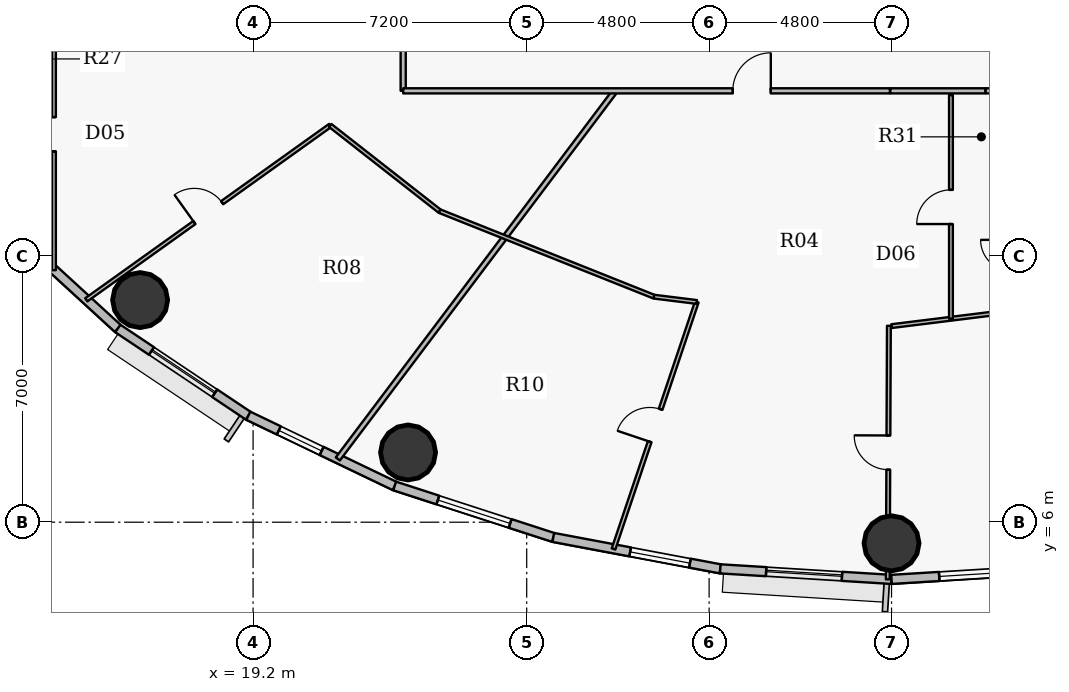
"""IFC4 building model, lengths in metres.
Left out: names, types, materials, properties, quantities, classifications, styles, units other than length and angle.
Written with IfcOpenShell. Run it as: python <this file> out.ifc"""

import sys

from ifc_helpers import new_model, si_unit, direction, frame, frame_2d, origin, origin_2d, place, context, subcontext, project, spatial, rectangle, hollow_circle, extrude, source, transform, mapped, element, fill, save


model = new_model("IFC4")
c1 = context("Model", 3, precision=1e-05, world=origin(), true_north=direction((0.0, 1.0)))
c2 = subcontext(c1, "Body", "Model", "MODEL_VIEW")
j1 = project(units=[si_unit("LENGTHUNIT", "METRE"), si_unit("PLANEANGLEUNIT", "RADIAN")], contexts=[c1])
p1 = place(None, origin())
s1 = spatial("IfcSite", under=j1, at=p1, CompositionType="ELEMENT")
p2 = place(p1, origin())
s2 = spatial("IfcBuilding", under=s1, at=p2, CompositionType="ELEMENT")
p3 = place(p2, frame((0.0, 0.0, 108.45)))
s3 = spatial("IfcBuildingStorey", under=s2, at=p3, CompositionType="ELEMENT", Elevation=108.45)
for number, where, z_axis, x_axis in (
    (1, (16.227, 11.844, 0.0), (0.0, 0.0, 1.0), (1.0, 0.0, 0.0)),
    (2, (23.278, 7.835, 0.0), (0.0, 0.0, 1.0), (1.0, 0.0, 0.0)),
    (3, (36.0, 5.445, 0.0), (0.0, 0.0, 1.0), (1.0, 0.0, 0.0)),
):
    element("IfcColumn", number, at=place(p3, frame(where, z_axis=z_axis, x_axis=x_axis)), inside=s3, PredefinedType="COLUMN", context=c2, shape_type="SweptSolid", body=[
        extrude(hollow_circle(Radius=0.725, WallThickness=0.042, at=origin_2d()), origin(), (0.0, 0.0, 1.0), 3.75),
    ])
p4 = place(p3, frame((15.642, 11.097, 0.0), z_axis=(0.0, 0.0, 1.0), x_axis=(-0.737113356241, 0.675769117414, 0.0)))
e4 = element("IfcWall", 4, at=p4, inside=s3, PredefinedType="SOLIDWALL", context=c2, shape_type="SweptSolid", body=[
    extrude(rectangle(XDim=3.976, YDim=0.24, at=frame_2d((1.988, 0.0))), origin(), (0.0, 0.0, 1.0), 3.5),
])
p5 = place(p4, frame((2.546, 0.0, 0.9)))
e5 = element("IfcOpeningElement", 5, at=p5, cuts=e4, PredefinedType="OPENING", context=c2, shape_type="SweptSolid", body=[
    extrude(rectangle(XDim=1.25, YDim=1.65, at=origin_2d()), frame((0.625, 0.13, 0.825), z_axis=(0.0, -1.0, 0.0), x_axis=(1.0, 0.0, 0.0)), (0.0, 0.0, 1.0), 0.26),
])
p6 = place(p3, frame((19.075, 8.801, 0.0), z_axis=(0.0, 0.0, 1.0), x_axis=(-0.831221811447, 0.555940914284, 0.0)))
e6 = element("IfcWall", 6, at=p6, inside=s3, PredefinedType="SOLIDWALL", context=c2, shape_type="SweptSolid", body=[
    extrude(rectangle(XDim=4.13, YDim=0.24, at=frame_2d((2.065, 0.0))), origin(), (0.0, 0.0, 1.0), 3.5),
])
p7 = place(p6, frame((1.065, 0.0, 0.9)))
e7 = element("IfcOpeningElement", 7, at=p7, cuts=e6, PredefinedType="OPENING", context=c2, shape_type="SweptSolid", body=[
    extrude(rectangle(XDim=2.0, YDim=1.75, at=origin_2d()), frame((1.0, 0.13, 0.875), z_axis=(0.0, -1.0, 0.0), x_axis=(1.0, 0.0, 0.0)), (0.0, 0.0, 1.0), 0.26),
])
p8 = place(p3, frame((22.926, 6.953, 0.0), z_axis=(0.0, 0.0, 1.0), x_axis=(-0.901589935876, 0.432591709962, 0.0)))
e8 = element("IfcWall", 8, at=p8, inside=s3, PredefinedType="SOLIDWALL", context=c2, shape_type="SweptSolid", body=[
    extrude(rectangle(XDim=4.272, YDim=0.24, at=frame_2d((2.136, 0.0))), origin(), (0.0, 0.0, 1.0), 3.5),
])
p9 = place(p8, frame((2.132, 0.0, 0.9)))
e9 = element("IfcOpeningElement", 9, at=p9, cuts=e8, PredefinedType="OPENING", context=c2, shape_type="SweptSolid", body=[
    extrude(rectangle(XDim=1.25, YDim=1.65, at=origin_2d()), frame((0.625, 0.13, 0.825), z_axis=(0.0, -1.0, 0.0), x_axis=(1.0, 0.0, 0.0)), (0.0, 0.0, 1.0), 0.26),
])
p10 = place(p3, frame((27.1, 5.599, 0.0), z_axis=(0.0, 0.0, 1.0), x_axis=(-0.951211346073, 0.308540070495, 0.0)))
e10 = element("IfcWall", 10, at=p10, inside=s3, PredefinedType="SOLIDWALL", context=c2, shape_type="SweptSolid", body=[
    extrude(rectangle(XDim=4.388, YDim=0.24, at=frame_2d((2.194, 0.0))), origin(), (0.0, 0.0, 1.0), 3.5),
])
p11 = place(p10, frame((1.194, 0.0, 0.9)))
e11 = element("IfcOpeningElement", 11, at=p11, cuts=e10, PredefinedType="OPENING", context=c2, shape_type="SweptSolid", body=[
    extrude(rectangle(XDim=2.0, YDim=1.75, at=origin_2d()), frame((1.0, 0.13, 0.875), z_axis=(0.0, -1.0, 0.0), x_axis=(1.0, 0.0, 0.0)), (0.0, 0.0, 1.0), 0.26),
])
p12 = place(p3, frame((31.494, 4.773, 0.0), z_axis=(0.0, 0.0, 1.0), x_axis=(-0.982789252177, 0.184730305596, 0.0)))
e12 = element("IfcWall", 12, at=p12, inside=s3, PredefinedType="SOLIDWALL", context=c2, shape_type="SweptSolid", body=[
    extrude(rectangle(XDim=4.471, YDim=0.24, at=frame_2d((2.235, 0.0))), origin(), (0.0, 0.0, 1.0), 3.5),
])
p13 = place(p12, frame((0.814, 0.0, 0.9)))
e13 = element("IfcOpeningElement", 13, at=p13, cuts=e12, PredefinedType="OPENING", context=c2, shape_type="SweptSolid", body=[
    extrude(rectangle(XDim=1.6, YDim=1.75, at=origin_2d()), frame((0.8, 0.13, 0.875), z_axis=(0.0, -1.0, 0.0), x_axis=(1.0, 0.0, 0.0)), (0.0, 0.0, 1.0), 0.26),
])
p14 = place(p3, frame((36.0, 4.495, 0.0), z_axis=(0.0, 0.0, 1.0), x_axis=(-0.998107531589, 0.061492726276, 0.0)))
e14 = element("IfcWall", 14, at=p14, inside=s3, PredefinedType="SOLIDWALL", context=c2, shape_type="SweptSolid", body=[
    extrude(rectangle(XDim=4.514, YDim=0.24, at=frame_2d((2.257, 0.0))), origin(), (0.0, 0.0, 1.0), 3.5),
])
p15 = place(p14, frame((1.306, 0.0, 0.9)))
e15 = element("IfcOpeningElement", 15, at=p15, cuts=e14, PredefinedType="OPENING", context=c2, shape_type="SweptSolid", body=[
    extrude(rectangle(XDim=2.0, YDim=1.75, at=origin_2d()), frame((1.0, 0.13, 0.875), z_axis=(0.0, -1.0, 0.0), x_axis=(1.0, 0.0, 0.0)), (0.0, 0.0, 1.0), 0.26),
])
p16 = place(p3, frame((40.506, 4.773, 0.0), z_axis=(0.0, 0.0, 1.0), x_axis=(-0.998107531589, -0.061492726276, 0.0)))
e16 = element("IfcWall", 16, at=p16, inside=s3, PredefinedType="SOLIDWALL", context=c2, shape_type="SweptSolid", body=[
    extrude(rectangle(XDim=4.514, YDim=0.24, at=frame_2d((2.257, 0.0))), origin(), (0.0, 0.0, 1.0), 3.5),
])
p17 = place(p16, frame((1.257, 0.0, 0.9)))
e17 = element("IfcOpeningElement", 17, at=p17, cuts=e16, PredefinedType="OPENING", context=c2, shape_type="SweptSolid", body=[
    extrude(rectangle(XDim=2.0, YDim=1.75, at=origin_2d()), frame((1.0, 0.13, 0.875), z_axis=(0.0, -1.0, 0.0), x_axis=(1.0, 0.0, 0.0)), (0.0, 0.0, 1.0), 0.26),
])
p18 = place(p3, frame((9.533, 18.337, 0.0), z_axis=(0.0, 0.0, 1.0), x_axis=(0.950384937961, 0.311076308478, 0.0)))
e18 = element("IfcWall", 18, at=p18, inside=s3, PredefinedType="PARTITIONING", context=c2, shape_type="SweptSolid", body=[
    extrude(rectangle(XDim=8.396, YDim=0.1, at=frame_2d((4.198, 0.0))), origin(), (0.0, 0.0, 1.0), 2.935),
])
p19 = place(p18, frame((6.057, 0.0, 0.0)))
e19 = element("IfcOpeningElement", 19, at=p19, cuts=e18, PredefinedType="OPENING", context=c2, shape_type="SweptSolid", body=[
    extrude(rectangle(XDim=0.9, YDim=2.1, at=origin_2d()), frame((0.45, 0.06, 1.05), z_axis=(0.0, -1.0, 0.0), x_axis=(1.0, 0.0, 0.0)), (0.0, 0.0, 1.0), 0.12),
])
p20 = place(p18, frame((0.88, 0.0, 0.0)))
e20 = element("IfcOpeningElement", 20, at=p20, cuts=e18, PredefinedType="OPENING", context=c2, shape_type="SweptSolid", body=[
    extrude(rectangle(XDim=0.82, YDim=2.1, at=origin_2d()), frame((0.41, 0.06, 1.05), z_axis=(0.0, -1.0, 0.0), x_axis=(1.0, 0.0, 0.0)), (0.0, 0.0, 1.0), 0.12),
])
p21 = place(p3, frame((13.96, 12.631, 0.0), z_axis=(0.0, 0.0, 1.0), x_axis=(0.0, 1.0, 0.0)))
e21 = element("IfcWall", 21, at=p21, inside=s3, PredefinedType="PARTITIONING", context=c2, shape_type="SweptSolid", body=[
    extrude(rectangle(XDim=7.154, YDim=0.1, at=frame_2d((3.577, 0.0))), origin(), (0.0, 0.0, 1.0), 2.935),
])
p22 = place(p21, frame((3.127, 0.0, 0.0)))
e22 = element("IfcOpeningElement", 22, at=p22, cuts=e21, PredefinedType="OPENING", context=c2, shape_type="SweptSolid", body=[
    extrude(rectangle(XDim=0.9, YDim=2.1, at=origin_2d()), frame((0.45, 0.06, 1.05), z_axis=(0.0, -1.0, 0.0), x_axis=(1.0, 0.0, 0.0)), (0.0, 0.0, 1.0), 0.12),
])
p23 = place(p3, frame((14.811, 11.851, 0.0), z_axis=(0.0, 0.0, 1.0), x_axis=(0.813476205606, 0.581598197137, 0.0)))
e23 = element("IfcWall", 23, at=p23, inside=s3, PredefinedType="PARTITIONING", context=c2, shape_type="SweptSolid", body=[
    extrude(rectangle(XDim=7.889, YDim=0.1, at=frame_2d((3.945, 0.0))), origin(), (0.0, 0.0, 1.0), 2.935),
])
p24 = place(p23, frame((3.495, 0.0, 0.0)))
e24 = element("IfcOpeningElement", 24, at=p24, cuts=e23, PredefinedType="OPENING", context=c2, shape_type="SweptSolid", body=[
    extrude(rectangle(XDim=0.9, YDim=2.1, at=origin_2d()), frame((0.45, 0.06, 1.05), z_axis=(0.0, -1.0, 0.0), x_axis=(1.0, 0.0, 0.0)), (0.0, 0.0, 1.0), 0.12),
])
p25 = place(p3, frame((21.229, 16.44, 0.0), z_axis=(0.0, 0.0, 1.0), x_axis=(0.787324700524, -0.616538576201, 0.0)))
e25 = element("IfcWall", 25, at=p25, inside=s3, PredefinedType="PARTITIONING", context=c2, shape_type="SweptSolid", body=[
    extrude(rectangle(XDim=3.658, YDim=0.1, at=frame_2d((1.829, 0.0))), origin(), (0.0, 0.0, 1.0), 2.935),
])
p26 = place(p3, frame((21.43, 7.665, 0.0), z_axis=(0.0, 0.0, 1.0), x_axis=(0.601821582461, 0.798630567211, 0.0)))
e26 = element("IfcWall", 26, at=p26, inside=s3, PredefinedType="PARTITIONING", context=c2, shape_type="SweptSolid", body=[
    extrude(rectangle(XDim=12.127, YDim=0.135, at=frame_2d((6.063, 0.0))), origin(), (0.0, 0.0, 1.0), 2.935),
])
p27 = place(p3, frame((23.15, 17.35, 0.0), z_axis=(0.0, 0.0, 1.0), x_axis=(0.0, 1.0, 0.0)))
e27 = element("IfcWall", 27, at=p27, inside=s3, PredefinedType="PARTITIONING", context=c2, shape_type="SweptSolid", body=[
    extrude(rectangle(XDim=19.3, YDim=0.135, at=frame_2d((9.65, 0.0))), origin(), (0.0, 0.0, 1.0), 2.935),
])
p28 = place(p27, frame((15.889, 0.0, 0.0)))
e28 = element("IfcOpeningElement", 28, at=p28, cuts=e27, PredefinedType="OPENING", context=c2, shape_type="SweptSolid", body=[
    extrude(rectangle(XDim=1.0, YDim=2.15, at=origin_2d()), frame((0.5, 0.078, 1.075), z_axis=(0.0, -1.0, 0.0), x_axis=(1.0, 0.0, 0.0)), (0.0, 0.0, 1.0), 0.155),
])
p29 = place(p27, frame((6.279, 0.0, 0.0)))
e29 = element("IfcOpeningElement", 29, at=p29, cuts=e27, PredefinedType="OPENING", context=c2, shape_type="SweptSolid", body=[
    extrude(rectangle(XDim=1.0, YDim=2.15, at=origin_2d()), frame((0.5, 0.078, 1.075), z_axis=(0.0, -1.0, 0.0), x_axis=(1.0, 0.0, 0.0)), (0.0, 0.0, 1.0), 0.155),
])
p30 = place(p3, frame((23.15, 17.35, 0.0), z_axis=(0.0, 0.0, 1.0), x_axis=(1.0, 0.0, 0.0)))
e30 = element("IfcWall", 30, at=p30, inside=s3, PredefinedType="PARTITIONING", context=c2, shape_type="SweptSolid", body=[
    extrude(rectangle(XDim=12.808, YDim=0.135, at=frame_2d((6.404, 0.0))), origin(), (0.0, 0.0, 1.0), 2.935),
])
p31 = place(p30, frame((8.673, 0.0, 0.0)))
e31 = element("IfcOpeningElement", 31, at=p31, cuts=e30, PredefinedType="OPENING", context=c2, shape_type="SweptSolid", body=[
    extrude(rectangle(XDim=1.0, YDim=2.15, at=origin_2d()), frame((0.5, 0.078, 1.075), z_axis=(0.0, -1.0, 0.0), x_axis=(1.0, 0.0, 0.0)), (0.0, 0.0, 1.0), 0.155),
])
p32 = place(p3, frame((24.109, 14.184, 0.0), z_axis=(0.0, 0.0, 1.0), x_axis=(0.928803554156, -0.370572473055, 0.0)))
e32 = element("IfcWall", 32, at=p32, inside=s3, PredefinedType="PARTITIONING", context=c2, shape_type="SweptSolid", body=[
    extrude(rectangle(XDim=6.072, YDim=0.1, at=frame_2d((3.036, 0.0))), origin(), (0.0, 0.0, 1.0), 2.935),
])
p33 = place(p3, frame((28.685, 5.296, 0.0), z_axis=(0.0, 0.0, 1.0), x_axis=(0.319387131438, 0.947624324441, 0.0)))
e33 = element("IfcWall", 33, at=p33, inside=s3, PredefinedType="PARTITIONING", context=c2, shape_type="SweptSolid", body=[
    extrude(rectangle(XDim=6.858, YDim=0.1, at=frame_2d((3.429, 0.0))), origin(), (0.0, 0.0, 1.0), 2.935),
])
p34 = place(p33, frame((2.979, 0.0, 0.0)))
e34 = element("IfcOpeningElement", 34, at=p34, cuts=e33, PredefinedType="OPENING", context=c2, shape_type="SweptSolid", body=[
    extrude(rectangle(XDim=0.9, YDim=2.1, at=origin_2d()), frame((0.45, 0.06, 1.05), z_axis=(0.0, -1.0, 0.0), x_axis=(1.0, 0.0, 0.0)), (0.0, 0.0, 1.0), 0.12),
])
p35 = place(p3, frame((29.749, 11.934, 0.0), z_axis=(0.0, 0.0, 1.0), x_axis=(0.99240961586, -0.122976234894, 0.0)))
e35 = element("IfcWall", 35, at=p35, inside=s3, PredefinedType="PARTITIONING", context=c2, shape_type="SweptSolid", body=[
    extrude(rectangle(XDim=1.135, YDim=0.1, at=frame_2d((0.568, 0.0))), origin(), (0.0, 0.0, 1.0), 3.5),
])
p36 = place(p3, frame((35.902, 4.496, 0.0), z_axis=(0.0, 0.0, 1.0), x_axis=(0.004354785612, 0.999990517876, 0.0)))
e36 = element("IfcWall", 36, at=p36, inside=s3, PredefinedType="PARTITIONING", context=c2, shape_type="SweptSolid", body=[
    extrude(rectangle(XDim=6.671, YDim=0.1, at=frame_2d((3.336, 0.0))), origin(), (0.0, 0.0, 1.0), 2.935),
])
p37 = place(p36, frame((2.886, 0.0, 0.0)))
e37 = element("IfcOpeningElement", 37, at=p37, cuts=e36, PredefinedType="OPENING", context=c2, shape_type="SweptSolid", body=[
    extrude(rectangle(XDim=0.9, YDim=2.1, at=origin_2d()), frame((0.45, 0.06, 1.05), z_axis=(0.0, -1.0, 0.0), x_axis=(1.0, 0.0, 0.0)), (0.0, 0.0, 1.0), 0.12),
])
p38 = place(p3, frame((36.0, 11.159, 0.0), z_axis=(0.0, 0.0, 1.0), x_axis=(0.992395485088, 0.123090215599, 0.0)))
e38 = element("IfcWall", 38, at=p38, inside=s3, PredefinedType="PARTITIONING", context=c2, shape_type="SweptSolid", body=[
    extrude(rectangle(XDim=6.299, YDim=0.1, at=frame_2d((3.15, 0.0))), origin(), (0.0, 0.0, 1.0), 2.935),
])
p39 = place(p3, frame((37.564, 11.353, 0.0), z_axis=(0.0, 0.0, 1.0), x_axis=(0.0, 1.0, 0.0)))
e39 = element("IfcWall", 39, at=p39, inside=s3, PredefinedType="PARTITIONING", context=c2, shape_type="SweptSolid", body=[
    extrude(rectangle(XDim=5.884, YDim=0.1, at=frame_2d((2.942, 0.0))), origin(), (0.0, 0.0, 1.0), 3.125),
])
p40 = place(p39, frame((2.492, 0.0, 0.0)))
e40 = element("IfcOpeningElement", 40, at=p40, cuts=e39, PredefinedType="OPENING", context=c2, shape_type="SweptSolid", body=[
    extrude(rectangle(XDim=0.9, YDim=2.1, at=origin_2d()), frame((0.45, 0.06, 1.05), z_axis=(0.0, -1.0, 0.0), x_axis=(1.0, 0.0, 0.0)), (0.0, 0.0, 1.0), 0.12),
])
p41 = place(p3, frame((38.477, 17.35, 0.0), z_axis=(0.0, 0.0, 1.0), x_axis=(1.0, 0.0, 0.0)))
e41 = element("IfcWall", 41, at=p41, inside=s3, PredefinedType="PARTITIONING", context=c2, shape_type="SweptSolid", body=[
    extrude(rectangle(XDim=10.373, YDim=0.135, at=frame_2d((5.187, 0.0))), origin(), (0.0, 0.0, 1.0), 2.935),
])
p42 = place(p3, frame((38.467, 17.35, 0.0), z_axis=(0.0, 0.0, 1.0), x_axis=(-1.0, 0.0, 0.0)))
e42 = element("IfcWall", 42, at=p42, inside=s3, PredefinedType="PARTITIONING", context=c2, shape_type="SweptSolid", body=[
    extrude(rectangle(XDim=2.499, YDim=0.135, at=frame_2d((1.25, 0.0))), origin(), (0.0, 0.0, 1.0), 2.935),
])
m1 = source(origin(), c2, "Body", "SweptSolid", [
    extrude(rectangle(XDim=2.0, YDim=1.75, at=origin_2d()), frame((1.0, 0.03, 0.875), z_axis=(0.0, -1.0, 0.0), x_axis=(1.0, 0.0, 0.0)), (0.0, 0.0, 1.0), 0.06),
])
p43 = place(p7, origin())
e43 = element("IfcWindow", 43, at=p43, inside=s3, PartitioningType="DOUBLE_PANEL_VERTICAL", PredefinedType="WINDOW", context=c2, shape_type="MappedRepresentation", body=[
    mapped(m1, transform((0.0, 0.0, 0.0), x_axis=(1.0, 0.0, 0.0), y_axis=(0.0, 1.0, 0.0), z_axis=(0.0, 0.0, 1.0), scale=1.0)),
])
fill(e7, e43)
m2 = source(origin(), c2, "Body", "SweptSolid", [
    extrude(rectangle(XDim=1.25, YDim=1.65, at=origin_2d()), frame((0.625, 0.03, 0.825), z_axis=(0.0, -1.0, 0.0), x_axis=(1.0, 0.0, 0.0)), (0.0, 0.0, 1.0), 0.06),
])
p44 = place(p9, origin())
e44 = element("IfcWindow", 44, at=p44, inside=s3, PartitioningType="SINGLE_PANEL", PredefinedType="WINDOW", context=c2, shape_type="MappedRepresentation", body=[
    mapped(m2, transform((0.0, 0.0, 0.0), x_axis=(1.0, 0.0, 0.0), y_axis=(0.0, 1.0, 0.0), z_axis=(0.0, 0.0, 1.0), scale=1.0)),
])
fill(e9, e44)
p45 = place(p11, origin())
e45 = element("IfcWindow", 45, at=p45, inside=s3, PartitioningType="DOUBLE_PANEL_VERTICAL", PredefinedType="WINDOW", context=c2, shape_type="MappedRepresentation", body=[
    mapped(m1, transform((0.0, 0.0, 0.0), x_axis=(1.0, 0.0, 0.0), y_axis=(0.0, 1.0, 0.0), z_axis=(0.0, 0.0, 1.0), scale=1.0)),
])
fill(e11, e45)
m3 = source(origin(), c2, "Body", "SweptSolid", [
    extrude(rectangle(XDim=1.6, YDim=1.75, at=origin_2d()), frame((0.8, 0.03, 0.875), z_axis=(0.0, -1.0, 0.0), x_axis=(1.0, 0.0, 0.0)), (0.0, 0.0, 1.0), 0.06),
])
p46 = place(p13, origin())
e46 = element("IfcWindow", 46, at=p46, inside=s3, PartitioningType="DOUBLE_PANEL_VERTICAL", PredefinedType="WINDOW", context=c2, shape_type="MappedRepresentation", body=[
    mapped(m3, transform((0.0, 0.0, 0.0), x_axis=(1.0, 0.0, 0.0), y_axis=(0.0, 1.0, 0.0), z_axis=(0.0, 0.0, 1.0), scale=1.0)),
])
fill(e13, e46)
p47 = place(p15, origin())
e47 = element("IfcWindow", 47, at=p47, inside=s3, PartitioningType="DOUBLE_PANEL_VERTICAL", PredefinedType="WINDOW", context=c2, shape_type="MappedRepresentation", body=[
    mapped(m1, transform((0.0, 0.0, 0.0), x_axis=(1.0, 0.0, 0.0), y_axis=(0.0, 1.0, 0.0), z_axis=(0.0, 0.0, 1.0), scale=1.0)),
])
fill(e15, e47)
p48 = place(p17, origin())
e48 = element("IfcWindow", 48, at=p48, inside=s3, PartitioningType="DOUBLE_PANEL_VERTICAL", PredefinedType="WINDOW", context=c2, shape_type="MappedRepresentation", body=[
    mapped(m1, transform((0.0, 0.0, 0.0), x_axis=(1.0, 0.0, 0.0), y_axis=(0.0, 1.0, 0.0), z_axis=(0.0, 0.0, 1.0), scale=1.0)),
])
fill(e17, e48)
m4 = source(origin(), c2, "Body", "SweptSolid", [
    extrude(rectangle(XDim=0.9, YDim=2.1, at=origin_2d()), frame((0.45, 0.025, 1.05), z_axis=(0.0, -1.0, 0.0), x_axis=(1.0, 0.0, 0.0)), (0.0, 0.0, 1.0), 0.05),
])
p49 = place(p24, origin())
e49 = element("IfcDoor", 49, at=p49, inside=s3, OperationType="SINGLE_SWING_LEFT", PredefinedType="DOOR", context=c2, shape_type="MappedRepresentation", body=[
    mapped(m4, transform((0.0, 0.0, 0.0), x_axis=(1.0, 0.0, 0.0), y_axis=(0.0, 1.0, 0.0), z_axis=(0.0, 0.0, 1.0), scale=1.0)),
])
fill(e24, e49)
p50 = place(p22, origin())
e50 = element("IfcDoor", 50, at=p50, inside=s3, OperationType="SINGLE_SWING_LEFT", PredefinedType="DOOR", context=c2, shape_type="MappedRepresentation", body=[
    mapped(m4, transform((0.0, 0.0, 0.0), x_axis=(1.0, 0.0, 0.0), y_axis=(0.0, 1.0, 0.0), z_axis=(0.0, 0.0, 1.0), scale=1.0)),
])
fill(e22, e50)
m5 = source(origin(), c2, "Body", "SweptSolid", [
    extrude(rectangle(XDim=1.0, YDim=2.15, at=origin_2d()), frame((0.5, 0.025, 1.075), z_axis=(0.0, -1.0, 0.0), x_axis=(1.0, 0.0, 0.0)), (0.0, 0.0, 1.0), 0.05),
])
p51 = place(p31, origin())
e51 = element("IfcDoor", 51, at=p51, inside=s3, OperationType="SINGLE_SWING_RIGHT", PredefinedType="DOOR", context=c2, shape_type="MappedRepresentation", body=[
    mapped(m5, transform((0.0, 0.0, 0.0), x_axis=(1.0, 0.0, 0.0), y_axis=(0.0, 1.0, 0.0), z_axis=(0.0, 0.0, 1.0), scale=1.0)),
])
fill(e31, e51)
p52 = place(p34, origin())
e52 = element("IfcDoor", 52, at=p52, inside=s3, OperationType="SINGLE_SWING_LEFT", PredefinedType="DOOR", context=c2, shape_type="MappedRepresentation", body=[
    mapped(m4, transform((0.0, 0.0, 0.0), x_axis=(1.0, 0.0, 0.0), y_axis=(0.0, 1.0, 0.0), z_axis=(0.0, 0.0, 1.0), scale=1.0)),
])
fill(e34, e52)
p53 = place(p37, origin())
e53 = element("IfcDoor", 53, at=p53, inside=s3, OperationType="SINGLE_SWING_RIGHT", PredefinedType="DOOR", context=c2, shape_type="MappedRepresentation", body=[
    mapped(m4, transform((0.0, 0.0, 0.0), x_axis=(1.0, 0.0, 0.0), y_axis=(0.0, 1.0, 0.0), z_axis=(0.0, 0.0, 1.0), scale=1.0)),
])
fill(e37, e53)
p54 = place(p40, origin())
e54 = element("IfcDoor", 54, at=p54, inside=s3, OperationType="SINGLE_SWING_LEFT", PredefinedType="DOOR", context=c2, shape_type="MappedRepresentation", body=[
    mapped(m4, transform((0.0, 0.0, 0.0), x_axis=(1.0, 0.0, 0.0), y_axis=(0.0, 1.0, 0.0), z_axis=(0.0, 0.0, 1.0), scale=1.0)),
])
fill(e40, e54)
save(model, sys.argv[1])
